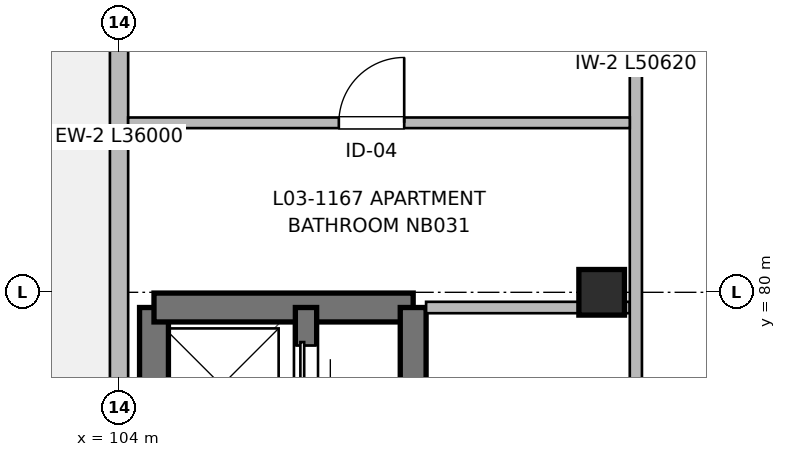
"""IFC4 building model, lengths in metres.
Left out: names, types, materials, properties, quantities, classifications, styles, units other than length and angle.
Written with IfcOpenShell. Run it as: python <this file> out.ifc"""

import sys

from ifc_helpers import new_model, si_unit, direction, frame, frame_2d, origin, origin_2d, place, context, subcontext, project, spatial, rectangle, extrude, element, fill, save


model = new_model("IFC4")
c1 = context("Model", 3, precision=1e-05, world=origin(), true_north=direction((0.0, 1.0)))
c2 = subcontext(c1, "Body", "Model", "MODEL_VIEW")
j1 = project(units=[si_unit("LENGTHUNIT", "METRE"), si_unit("PLANEANGLEUNIT", "RADIAN")], contexts=[c1])
p1 = place(None, origin())
s1 = spatial("IfcSite", under=j1, at=p1, CompositionType="ELEMENT")
p2 = place(p1, origin())
s2 = spatial("IfcBuilding", under=s1, at=p2, CompositionType="ELEMENT")
p3 = place(p2, frame((0.0, 0.0, 10.56)))
s3 = spatial("IfcBuildingStorey", under=s2, at=p3, CompositionType="ELEMENT", Elevation=10.56)
p4 = place(p3, frame((110.35, 80.0, 0.0), z_axis=(0.0, 0.0, 1.0), x_axis=(1.0, 0.0, 0.0)))
e1 = element("IfcColumn", 1, at=p4, inside=s3, PredefinedType="COLUMN", context=c2, shape_type="SweptSolid", body=[
    extrude(rectangle(XDim=0.6, YDim=0.6, at=origin_2d()), origin(), (0.0, 0.0, 1.0), 3.2),
])
p5 = place(p3, frame((104.46, 67.35, 0.0), z_axis=(0.0, 0.0, 1.0), x_axis=(0.0, 1.0, 0.0)))
e2 = element("IfcWall", 2, at=p5, inside=s3, PredefinedType="SHEAR", context=c2, shape_type="SweptSolid", body=[
    extrude(rectangle(XDim=12.45, YDim=0.38, at=frame_2d((6.225, 0.0))), origin(), (0.0, 0.0, 1.0), 3.2),
])
p6 = place(p5, frame((2.2, 0.0, 0.97)))
e3 = element("IfcOpeningElement", 3, at=p6, cuts=e2, PredefinedType="OPENING", context=c2, shape_type="SweptSolid", body=[
    extrude(rectangle(XDim=0.95, YDim=1.25, at=frame_2d((0.475, 0.625))), frame((0.0, 0.2, 0.0), z_axis=(0.0, -1.0, 0.0), x_axis=(1.0, 0.0, 0.0)), (0.0, 0.0, 1.0), 0.4),
])
p7 = place(p3, frame((104.46, 79.8, 0.0), z_axis=(0.0, 0.0, 1.0), x_axis=(1.0, 0.0, 0.0)))
e4 = element("IfcWall", 4, at=p7, inside=s3, PredefinedType="SHEAR", context=c2, shape_type="SweptSolid", body=[
    extrude(rectangle(XDim=3.41, YDim=0.38, at=frame_2d((1.705, 0.0))), origin(), (0.0, 0.0, 1.0), 3.2),
])
p8 = place(p3, frame((107.87, 79.8, 0.0), z_axis=(0.0, 0.0, 1.0), x_axis=(0.0, -1.0, 0.0)))
e5 = element("IfcWall", 5, at=p8, inside=s3, PredefinedType="SHEAR", context=c2, shape_type="SweptSolid", body=[
    extrude(rectangle(XDim=12.45, YDim=0.34, at=frame_2d((6.225, 0.0))), origin(), (0.0, 0.0, 1.0), 3.2),
])
p9 = place(p8, frame((10.85, 0.0, 0.0)))
e6 = element("IfcOpeningElement", 6, at=p9, cuts=e5, PredefinedType="OPENING", context=c2, shape_type="SweptSolid", body=[
    extrude(rectangle(XDim=1.05, YDim=2.15, at=frame_2d((0.525, 1.075))), frame((0.0, 0.18, 0.0), z_axis=(0.0, -1.0, 0.0), x_axis=(1.0, 0.0, 0.0)), (0.0, 0.0, 1.0), 0.36),
])
p10 = place(p3, frame((106.46, 74.55, 0.0), z_axis=(0.0, 0.0, 1.0), x_axis=(0.0, 1.0, 0.0)))
e7 = element("IfcWall", 7, at=p10, inside=s3, PredefinedType="SHEAR", context=c2, shape_type="SweptSolid", body=[
    extrude(rectangle(XDim=5.25, YDim=0.28, at=frame_2d((2.625, 0.0))), origin(), (0.0, 0.0, 1.0), 3.2),
])
p11 = place(p10, frame((1.15, 0.0, 0.0)))
e8 = element("IfcOpeningElement", 8, at=p11, cuts=e7, PredefinedType="OPENING", context=c2, shape_type="SweptSolid", body=[
    extrude(rectangle(XDim=1.0, YDim=2.15, at=frame_2d((0.5, 1.075))), frame((0.0, 0.15, 0.0), z_axis=(0.0, -1.0, 0.0), x_axis=(1.0, 0.0, 0.0)), (0.0, 0.0, 1.0), 0.3),
])
p12 = place(p10, frame((3.85, 0.0, 0.0)))
e9 = element("IfcOpeningElement", 9, at=p12, cuts=e7, PredefinedType="OPENING", context=c2, shape_type="SweptSolid", body=[
    extrude(rectangle(XDim=0.9, YDim=2.15, at=frame_2d((0.45, 1.075))), frame((0.0, 0.15, 0.0), z_axis=(0.0, -1.0, 0.0), x_axis=(1.0, 0.0, 0.0)), (0.0, 0.0, 1.0), 0.3),
])
p13 = place(p3, frame((104.0, 56.0, 0.0), z_axis=(0.0, 0.0, 1.0), x_axis=(0.0, 1.0, 0.0)))
e10 = element("IfcWall", 10, at=p13, inside=s3, PredefinedType="SOLIDWALL", context=c2, shape_type="SweptSolid", body=[
    extrude(rectangle(XDim=36.0, YDim=0.24, at=frame_2d((18.0, 0.0))), origin(), (0.0, 0.0, 1.0), 2.98),
])
p14 = place(p13, frame((3.9, 0.0, 0.0)))
e11 = element("IfcOpeningElement", 11, at=p14, cuts=e10, PredefinedType="OPENING", context=c2, shape_type="SweptSolid", body=[
    extrude(rectangle(XDim=1.2, YDim=2.2, at=frame_2d((0.6, 1.1))), frame((0.0, 0.13, 0.0), z_axis=(0.0, -1.0, 0.0), x_axis=(1.0, 0.0, 0.0)), (0.0, 0.0, 1.0), 0.26),
])
p15 = place(p13, frame((5.8, 0.0, 0.72)))
e12 = element("IfcOpeningElement", 12, at=p15, cuts=e10, PredefinedType="OPENING", context=c2, shape_type="SweptSolid", body=[
    extrude(rectangle(XDim=1.8, YDim=1.5, at=frame_2d((0.9, 0.75))), frame((0.0, 0.13, 0.0), z_axis=(0.0, -1.0, 0.0), x_axis=(1.0, 0.0, 0.0)), (0.0, 0.0, 1.0), 0.26),
])
p16 = place(p13, frame((12.65, 0.0, 0.72)))
e13 = element("IfcOpeningElement", 13, at=p16, cuts=e10, PredefinedType="OPENING", context=c2, shape_type="SweptSolid", body=[
    extrude(rectangle(XDim=1.7, YDim=1.5, at=frame_2d((0.85, 0.75))), frame((0.0, 0.13, 0.0), z_axis=(0.0, -1.0, 0.0), x_axis=(1.0, 0.0, 0.0)), (0.0, 0.0, 1.0), 0.26),
])
p17 = place(p13, frame((19.0, 0.0, 0.57)))
e14 = element("IfcOpeningElement", 14, at=p17, cuts=e10, PredefinedType="OPENING", context=c2, shape_type="SweptSolid", body=[
    extrude(rectangle(XDim=2.3, YDim=1.65, at=frame_2d((1.15, 0.825))), frame((0.0, 0.13, 0.0), z_axis=(0.0, -1.0, 0.0), x_axis=(1.0, 0.0, 0.0)), (0.0, 0.0, 1.0), 0.26),
])
p18 = place(p13, frame((30.775, 0.0, 0.77)))
e15 = element("IfcOpeningElement", 15, at=p18, cuts=e10, PredefinedType="OPENING", context=c2, shape_type="SweptSolid", body=[
    extrude(rectangle(XDim=1.45, YDim=1.45, at=frame_2d((0.725, 0.725))), frame((0.0, 0.13, 0.0), z_axis=(0.0, -1.0, 0.0), x_axis=(1.0, 0.0, 0.0)), (0.0, 0.0, 1.0), 0.26),
])
p19 = place(p3, frame((108.04, 79.8, 0.0), z_axis=(0.0, 0.0, 1.0), x_axis=(1.0, 0.0, 0.0)))
e16 = element("IfcWall", 16, at=p19, inside=s3, PredefinedType="PARTITIONING", context=c2, shape_type="SweptSolid", body=[
    extrude(rectangle(XDim=2.68, YDim=0.15, at=frame_2d((1.34, 0.0))), origin(), (0.0, 0.0, 1.0), 2.935),
])
p20 = place(p3, frame((110.8, 56.18, 0.0), z_axis=(0.0, 0.0, 1.0), x_axis=(0.0, 1.0, 0.0)))
e17 = element("IfcWall", 17, at=p20, inside=s3, PredefinedType="PARTITIONING", context=c2, shape_type="SweptSolid", body=[
    extrude(rectangle(XDim=50.62, YDim=0.16, at=frame_2d((25.31, 0.0))), origin(), (0.0, 0.0, 1.0), 2.935),
])
p21 = place(p20, frame((12.82, 0.0, 0.0)))
e18 = element("IfcOpeningElement", 18, at=p21, cuts=e17, PredefinedType="OPENING", context=c2, shape_type="SweptSolid", body=[
    extrude(rectangle(XDim=1.1, YDim=2.15, at=frame_2d((0.55, 1.075))), frame((0.0, 0.09, 0.0), z_axis=(0.0, -1.0, 0.0), x_axis=(1.0, 0.0, 0.0)), (0.0, 0.0, 1.0), 0.18),
])
p22 = place(p20, frame((19.22, 0.0, 0.0)))
e19 = element("IfcOpeningElement", 19, at=p22, cuts=e17, PredefinedType="OPENING", context=c2, shape_type="SweptSolid", body=[
    extrude(rectangle(XDim=1.6, YDim=2.15, at=frame_2d((0.8, 1.075))), frame((0.0, 0.09, 0.0), z_axis=(0.0, -1.0, 0.0), x_axis=(1.0, 0.0, 0.0)), (0.0, 0.0, 1.0), 0.18),
])
p23 = place(p20, frame((1.8, 0.0, 0.0)))
e20 = element("IfcOpeningElement", 20, at=p23, cuts=e17, PredefinedType="OPENING", context=c2, shape_type="SweptSolid", body=[
    extrude(rectangle(XDim=0.96, YDim=2.15, at=frame_2d((0.48, 1.075))), frame((0.0, 0.09, 0.0), z_axis=(0.0, -1.0, 0.0), x_axis=(1.0, 0.0, 0.0)), (0.0, 0.0, 1.0), 0.18),
])
p24 = place(p20, frame((32.825, 0.0, 0.0)))
e21 = element("IfcOpeningElement", 21, at=p24, cuts=e17, PredefinedType="OPENING", context=c2, shape_type="SweptSolid", body=[
    extrude(rectangle(XDim=0.98, YDim=2.15, at=frame_2d((0.49, 1.075))), frame((0.0, 0.09, 0.0), z_axis=(0.0, -1.0, 0.0), x_axis=(1.0, 0.0, 0.0)), (0.0, 0.0, 1.0), 0.18),
])
p25 = place(p20, frame((40.635, 0.0, 0.0)))
e22 = element("IfcOpeningElement", 22, at=p25, cuts=e17, PredefinedType="OPENING", context=c2, shape_type="SweptSolid", body=[
    extrude(rectangle(XDim=0.98, YDim=2.15, at=frame_2d((0.49, 1.075))), frame((0.0, 0.09, 0.0), z_axis=(0.0, -1.0, 0.0), x_axis=(1.0, 0.0, 0.0)), (0.0, 0.0, 1.0), 0.18),
])
p26 = place(p3, frame((104.12, 82.23, 0.0), z_axis=(0.0, 0.0, 1.0), x_axis=(1.0, 0.0, 0.0)))
e23 = element("IfcWall", 23, at=p26, inside=s3, PredefinedType="PARTITIONING", context=c2, shape_type="SweptSolid", body=[
    extrude(rectangle(XDim=6.6, YDim=0.14, at=frame_2d((3.3, 0.0))), origin(), (0.0, 0.0, 1.0), 2.935),
])
p27 = place(p26, frame((2.772, 0.0, 0.0)))
e24 = element("IfcOpeningElement", 24, at=p27, cuts=e23, PredefinedType="OPENING", context=c2, shape_type="SweptSolid", body=[
    extrude(rectangle(XDim=0.86, YDim=2.1, at=frame_2d((0.43, 1.05))), frame((0.0, 0.08, 0.0), z_axis=(0.0, -1.0, 0.0), x_axis=(1.0, 0.0, 0.0)), (0.0, 0.0, 1.0), 0.16),
])
p28 = place(p12, origin())
e25 = element("IfcDoor", 25, at=p28, inside=s3, OperationType="SLIDING_TO_RIGHT", PredefinedType="DOOR", context=c2, shape_type="SweptSolid", body=[
    extrude(rectangle(XDim=0.9, YDim=2.15, at=frame_2d((0.45, 1.075))), frame((0.0, 0.025, 0.0), z_axis=(0.0, -1.0, 0.0), x_axis=(1.0, 0.0, 0.0)), (0.0, 0.0, 1.0), 0.05),
])
fill(e9, e25)
p29 = place(p27, origin())
e26 = element("IfcDoor", 26, at=p29, inside=s3, OperationType="SINGLE_SWING_RIGHT", PredefinedType="DOOR", context=c2, shape_type="SweptSolid", body=[
    extrude(rectangle(XDim=0.86, YDim=2.1, at=frame_2d((0.43, 1.05))), frame((0.0, 0.025, 0.0), z_axis=(0.0, -1.0, 0.0), x_axis=(1.0, 0.0, 0.0)), (0.0, 0.0, 1.0), 0.05),
])
fill(e24, e26)
save(model, sys.argv[1])
